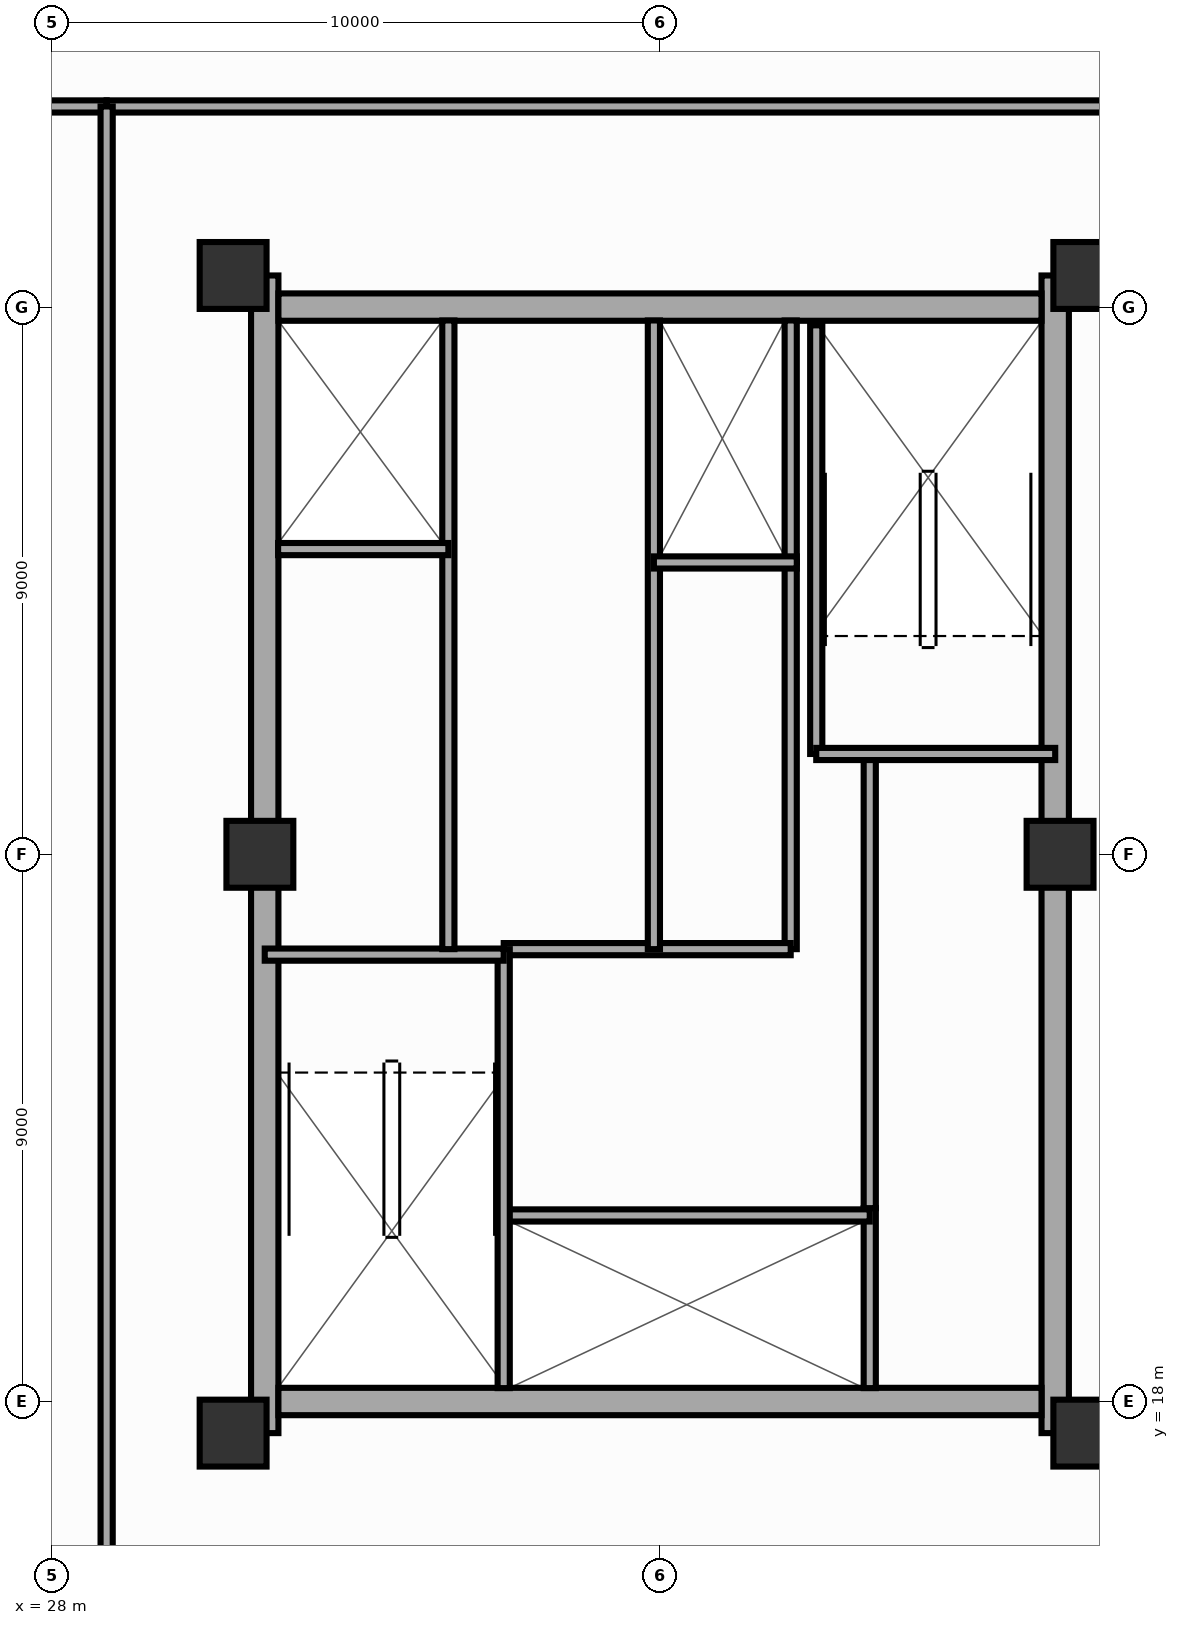
"""IFC4 building model, lengths in metres.
Left out: names, types, materials, properties, quantities, classifications, styles, units other than length and angle.
Written with IfcOpenShell. Run it as: python <this file> out.ifc"""

import sys

from ifc_helpers import new_model, si_unit, direction, frame, frame_2d, origin, origin_2d, place, context, subcontext, project, spatial, rectangle, extrude, source, transform, mapped, element, fill, save


model = new_model("IFC4")
c1 = context("Model", 3, precision=1e-05, world=origin(), true_north=direction((0.0, 1.0)))
c2 = subcontext(c1, "Body", "Model", "MODEL_VIEW")
j1 = project(units=[si_unit("LENGTHUNIT", "METRE"), si_unit("PLANEANGLEUNIT", "RADIAN")], contexts=[c1])
p1 = place(None, origin())
s1 = spatial("IfcSite", under=j1, at=p1, CompositionType="ELEMENT")
p2 = place(p1, origin())
s2 = spatial("IfcBuilding", under=s1, at=p2, CompositionType="ELEMENT")
p3 = place(p2, frame((0.0, 0.0, 206.5)))
s3 = spatial("IfcBuildingStorey", under=s2, at=p3, CompositionType="ELEMENT", Elevation=206.5)
p4 = place(p3, frame((31.5, 17.48, 0.0), z_axis=(0.0, 0.0, 1.0), x_axis=(0.0, 1.0, 0.0)))
e1 = element("IfcWall", 1, at=p4, inside=s3, PredefinedType="SHEAR", context=c2, shape_type="SweptSolid", body=[
    extrude(rectangle(XDim=19.04, YDim=0.45, at=frame_2d((9.52, 0.0))), origin(), (0.0, 0.0, 1.0), 3.8),
])
p5 = place(p4, frame((6.32, 0.0, 0.0)))
e2 = element("IfcOpeningElement", 2, at=p5, cuts=e1, PredefinedType="OPENING", context=c2, shape_type="SweptSolid", body=[
    extrude(rectangle(XDim=1.1, YDim=2.15, at=frame_2d((0.55, 1.075))), frame((0.0, 0.237, 0.0), z_axis=(0.0, -1.0, 0.0), x_axis=(1.0, 0.0, 0.0)), (0.0, 0.0, 1.0), 0.474),
])
p6 = place(p3, frame((44.5, 17.48, 0.0), z_axis=(0.0, 0.0, 1.0), x_axis=(0.0, 1.0, 0.0)))
e3 = element("IfcWall", 3, at=p6, inside=s3, PredefinedType="SHEAR", context=c2, shape_type="SweptSolid", body=[
    extrude(rectangle(XDim=19.04, YDim=0.45, at=frame_2d((9.52, 0.0))), origin(), (0.0, 0.0, 1.0), 3.8),
])
p7 = place(p6, frame((12.67, 0.0, 0.0), z_axis=(0.0, 0.0, 1.0), x_axis=(-1.0, 0.0, 0.0)))
e4 = element("IfcOpeningElement", 4, at=p7, cuts=e3, PredefinedType="OPENING", context=c2, shape_type="SweptSolid", body=[
    extrude(rectangle(XDim=1.1, YDim=2.15, at=frame_2d((0.55, 1.075))), frame((0.0, 0.237, 0.0), z_axis=(0.0, -1.0, 0.0), x_axis=(1.0, 0.0, 0.0)), (0.0, 0.0, 1.0), 0.474),
])
p8 = place(p3, frame((31.725, 18.0, 0.0), z_axis=(0.0, 0.0, 1.0), x_axis=(1.0, 0.0, 0.0)))
e5 = element("IfcWall", 5, at=p8, inside=s3, PredefinedType="SHEAR", context=c2, shape_type="SweptSolid", body=[
    extrude(rectangle(XDim=12.55, YDim=0.45, at=frame_2d((6.275, 0.0))), origin(), (0.0, 0.0, 1.0), 3.8),
])
p9 = place(p3, frame((31.725, 36.0, 0.0), z_axis=(0.0, 0.0, 1.0), x_axis=(1.0, 0.0, 0.0)))
e6 = element("IfcWall", 6, at=p9, inside=s3, PredefinedType="SHEAR", context=c2, shape_type="SweptSolid", body=[
    extrude(rectangle(XDim=12.55, YDim=0.45, at=frame_2d((6.275, 0.0))), origin(), (0.0, 0.0, 1.0), 3.8),
])
p10 = place(p9, frame((5.225, 0.0, 0.0), z_axis=(0.0, 0.0, 1.0), x_axis=(-1.0, 0.0, 0.0)))
e7 = element("IfcOpeningElement", 7, at=p10, cuts=e6, PredefinedType="OPENING", context=c2, shape_type="SweptSolid", body=[
    extrude(rectangle(XDim=1.4, YDim=2.15, at=frame_2d((0.7, 1.075))), frame((0.0, 0.237, 0.0), z_axis=(0.0, -1.0, 0.0), x_axis=(1.0, 0.0, 0.0)), (0.0, 0.0, 1.0), 0.474),
])
m1 = source(origin(), c2, "Body", "SweptSolid", [
    extrude(rectangle(XDim=1.1, YDim=1.1, at=origin_2d()), origin(), (0.0, 0.0, 1.0), 3.8),
])
for number, where, z_axis, x_axis in (
    (8, (30.98, 17.48, 0.0), (0.0, 0.0, 1.0), (1.0, 0.0, 0.0)),
    (9, (45.02, 17.48, 0.0), (0.0, 0.0, 1.0), (1.0, 0.0, 0.0)),
    (10, (30.98, 36.52, 0.0), (0.0, 0.0, 1.0), (1.0, 0.0, 0.0)),
    (11, (45.02, 36.52, 0.0), (0.0, 0.0, 1.0), (1.0, 0.0, 0.0)),
    (12, (31.42, 27.0, 0.0), (0.0, 0.0, 1.0), (1.0, 0.0, 0.0)),
    (13, (44.58, 27.0, 0.0), (0.0, 0.0, 1.0), (1.0, 0.0, 0.0)),
):
    element("IfcColumn", number, at=place(p3, frame(where, z_axis=z_axis, x_axis=x_axis)), inside=s3, PredefinedType="COLUMN", context=c2, shape_type="MappedRepresentation", body=[
        mapped(m1, transform((0.0, 0.0, 0.0), scale=1.0)),
    ])
p11 = place(p3, frame((41.45, 18.22, 0.0), z_axis=(0.0, 0.0, 1.0), x_axis=(0.0, 1.0, 0.0)))
e14 = element("IfcWall", 14, at=p11, inside=s3, PredefinedType="PARTITIONING", context=c2, shape_type="SweptSolid", body=[
    extrude(rectangle(XDim=2.96, YDim=0.2, at=frame_2d((1.48, 0.0))), origin(), (0.0, 0.0, 1.0), 3.59),
])
p12 = place(p3, frame((41.45, 21.18, 0.0), z_axis=(0.0, 0.0, 1.0), x_axis=(0.0, 1.0, 0.0)))
e15 = element("IfcWall", 15, at=p12, inside=s3, PredefinedType="PARTITIONING", context=c2, shape_type="SweptSolid", body=[
    extrude(rectangle(XDim=7.42, YDim=0.2, at=frame_2d((3.71, 0.0))), origin(), (0.0, 0.0, 1.0), 3.59),
])
p13 = place(p12, frame((2.6, 0.0, 0.0)))
e16 = element("IfcOpeningElement", 16, at=p13, cuts=e15, PredefinedType="OPENING", context=c2, shape_type="SweptSolid", body=[
    extrude(rectangle(XDim=0.9, YDim=2.1, at=frame_2d((0.45, 1.05))), frame((0.0, 0.112, 0.0), z_axis=(0.0, -1.0, 0.0), x_axis=(1.0, 0.0, 0.0)), (0.0, 0.0, 1.0), 0.224),
])
p14 = place(p3, frame((40.15, 25.44, 0.0), z_axis=(0.0, 0.0, 1.0), x_axis=(0.0, 1.0, 0.0)))
e17 = element("IfcWall", 17, at=p14, inside=s3, PredefinedType="PARTITIONING", context=c2, shape_type="SweptSolid", body=[
    extrude(rectangle(XDim=6.36, YDim=0.2, at=frame_2d((3.18, 0.0))), origin(), (0.0, 0.0, 1.0), 3.59),
])
p15 = place(p3, frame((40.15, 31.8, 0.0), z_axis=(0.0, 0.0, 1.0), x_axis=(0.0, 1.0, 0.0)))
e18 = element("IfcWall", 18, at=p15, inside=s3, PredefinedType="PARTITIONING", context=c2, shape_type="SweptSolid", body=[
    extrude(rectangle(XDim=3.98, YDim=0.2, at=frame_2d((1.99, 0.0))), origin(), (0.0, 0.0, 1.0), 3.59),
])
p16 = place(p3, frame((35.43, 21.06, 0.0), z_axis=(0.0, 0.0, 1.0), x_axis=(1.0, 0.0, 0.0)))
e19 = element("IfcWall", 19, at=p16, inside=s3, PredefinedType="PARTITIONING", context=c2, shape_type="SweptSolid", body=[
    extrude(rectangle(XDim=6.02, YDim=0.2, at=frame_2d((3.01, 0.0))), origin(), (0.0, 0.0, 1.0), 3.59),
])
p17 = place(p16, frame((1.0, 0.0, 0.0)))
e20 = element("IfcOpeningElement", 20, at=p17, cuts=e19, PredefinedType="OPENING", context=c2, shape_type="SweptSolid", body=[
    extrude(rectangle(XDim=1.1, YDim=2.15, at=frame_2d((0.55, 1.075))), frame((0.0, 0.112, 0.0), z_axis=(0.0, -1.0, 0.0), x_axis=(1.0, 0.0, 0.0)), (0.0, 0.0, 1.0), 0.224),
])
p18 = place(p16, frame((2.95, 0.0, 0.0)))
e21 = element("IfcOpeningElement", 21, at=p18, cuts=e19, PredefinedType="OPENING", context=c2, shape_type="SweptSolid", body=[
    extrude(rectangle(XDim=1.1, YDim=2.15, at=frame_2d((0.55, 1.075))), frame((0.0, 0.112, 0.0), z_axis=(0.0, -1.0, 0.0), x_axis=(1.0, 0.0, 0.0)), (0.0, 0.0, 1.0), 0.224),
])
p19 = place(p16, frame((4.58, 0.0, 0.0)))
e22 = element("IfcOpeningElement", 22, at=p19, cuts=e19, PredefinedType="OPENING", context=c2, shape_type="SweptSolid", body=[
    extrude(rectangle(XDim=1.2, YDim=2.15, at=frame_2d((0.6, 1.075))), frame((0.0, 0.112, 0.0), z_axis=(0.0, -1.0, 0.0), x_axis=(1.0, 0.0, 0.0)), (0.0, 0.0, 1.0), 0.224),
])
p20 = place(p3, frame((35.43, 25.44, 0.0), z_axis=(0.0, 0.0, 1.0), x_axis=(1.0, 0.0, 0.0)))
e23 = element("IfcWall", 23, at=p20, inside=s3, PredefinedType="PARTITIONING", context=c2, shape_type="SweptSolid", body=[
    extrude(rectangle(XDim=4.72, YDim=0.2, at=frame_2d((2.36, 0.0))), origin(), (0.0, 0.0, 1.0), 3.59),
])
p21 = place(p20, frame((1.25, 0.0, 0.0)))
e24 = element("IfcOpeningElement", 24, at=p21, cuts=e23, PredefinedType="OPENING", context=c2, shape_type="SweptSolid", body=[
    extrude(rectangle(XDim=1.1, YDim=2.15, at=frame_2d((0.55, 1.075))), frame((0.0, 0.112, 0.0), z_axis=(0.0, -1.0, 0.0), x_axis=(1.0, 0.0, 0.0)), (0.0, 0.0, 1.0), 0.224),
])
p22 = place(p3, frame((35.43, 18.22, 0.0), z_axis=(0.0, 0.0, 1.0), x_axis=(0.0, 1.0, 0.0)))
e25 = element("IfcWall", 25, at=p22, inside=s3, PredefinedType="SOLIDWALL", context=c2, shape_type="SweptSolid", body=[
    extrude(rectangle(XDim=7.22, YDim=0.2, at=frame_2d((3.61, 0.0))), origin(), (0.0, 0.0, 1.0), 3.59),
])
p23 = place(p22, frame((6.68, 0.0, 0.0), z_axis=(0.0, 0.0, 1.0), x_axis=(-1.0, 0.0, 0.0)))
e26 = element("IfcOpeningElement", 26, at=p23, cuts=e25, PredefinedType="OPENING", context=c2, shape_type="SweptSolid", body=[
    extrude(rectangle(XDim=1.1, YDim=2.15, at=frame_2d((0.55, 1.075))), frame((0.0, 0.112, 0.0), z_axis=(0.0, -1.0, 0.0), x_axis=(1.0, 0.0, 0.0)), (0.0, 0.0, 1.0), 0.224),
])
p24 = place(p3, frame((31.5, 25.35, 0.0), z_axis=(0.0, 0.0, 1.0), x_axis=(1.0, 0.0, 0.0)))
e27 = element("IfcWall", 27, at=p24, inside=s3, PredefinedType="SOLIDWALL", context=c2, shape_type="SweptSolid", body=[
    extrude(rectangle(XDim=3.93, YDim=0.2, at=frame_2d((1.965, 0.0))), origin(), (0.0, 0.0, 1.0), 3.59),
])
p25 = place(p3, frame((40.57, 28.65, 0.0), z_axis=(0.0, 0.0, 1.0), x_axis=(0.0, 1.0, 0.0)))
e28 = element("IfcWall", 28, at=p25, inside=s3, PredefinedType="SOLIDWALL", context=c2, shape_type="SweptSolid", body=[
    extrude(rectangle(XDim=7.05, YDim=0.2, at=frame_2d((3.525, 0.0))), origin(), (0.0, 0.0, 1.0), 3.59),
])
p26 = place(p3, frame((40.57, 28.65, 0.0), z_axis=(0.0, 0.0, 1.0), x_axis=(1.0, 0.0, 0.0)))
e29 = element("IfcWall", 29, at=p26, inside=s3, PredefinedType="SOLIDWALL", context=c2, shape_type="SweptSolid", body=[
    extrude(rectangle(XDim=3.93, YDim=0.2, at=frame_2d((1.965, 0.0))), origin(), (0.0, 0.0, 1.0), 3.59),
])
p27 = place(p3, frame((34.52, 25.44, 0.0), z_axis=(0.0, 0.0, 1.0), x_axis=(0.0, 1.0, 0.0)))
e30 = element("IfcWall", 30, at=p27, inside=s3, PredefinedType="PARTITIONING", context=c2, shape_type="SweptSolid", body=[
    extrude(rectangle(XDim=10.34, YDim=0.2, at=frame_2d((5.17, 0.0))), origin(), (0.0, 0.0, 1.0), 3.59),
])
p28 = place(p27, frame((2.6, 0.0, 0.0)))
e31 = element("IfcOpeningElement", 31, at=p28, cuts=e30, PredefinedType="OPENING", context=c2, shape_type="SweptSolid", body=[
    extrude(rectangle(XDim=0.9, YDim=2.1, at=frame_2d((0.45, 1.05))), frame((0.0, 0.112, 0.0), z_axis=(0.0, -1.0, 0.0), x_axis=(1.0, 0.0, 0.0)), (0.0, 0.0, 1.0), 0.224),
])
p29 = place(p27, frame((7.01, 0.0, 0.0)))
e32 = element("IfcOpeningElement", 32, at=p29, cuts=e30, PredefinedType="OPENING", context=c2, shape_type="SweptSolid", body=[
    extrude(rectangle(XDim=1.0, YDim=2.15, at=frame_2d((0.5, 1.075))), frame((0.0, 0.112, 0.0), z_axis=(0.0, -1.0, 0.0), x_axis=(1.0, 0.0, 0.0)), (0.0, 0.0, 1.0), 0.224),
])
p30 = place(p27, frame((8.76, 0.0, 0.0)))
e33 = element("IfcOpeningElement", 33, at=p30, cuts=e30, PredefinedType="OPENING", context=c2, shape_type="SweptSolid", body=[
    extrude(rectangle(XDim=1.0, YDim=2.15, at=frame_2d((0.5, 1.075))), frame((0.0, 0.112, 0.0), z_axis=(0.0, -1.0, 0.0), x_axis=(1.0, 0.0, 0.0)), (0.0, 0.0, 1.0), 0.224),
])
p31 = place(p3, frame((31.72, 32.02, 0.0), z_axis=(0.0, 0.0, 1.0), x_axis=(1.0, 0.0, 0.0)))
e34 = element("IfcWall", 34, at=p31, inside=s3, PredefinedType="PARTITIONING", context=c2, shape_type="SweptSolid", body=[
    extrude(rectangle(XDim=2.8, YDim=0.2, at=frame_2d((1.4, 0.0))), origin(), (0.0, 0.0, 1.0), 3.59),
])
p32 = place(p3, frame((37.9, 25.44, 0.0), z_axis=(0.0, 0.0, 1.0), x_axis=(0.0, 1.0, 0.0)))
e35 = element("IfcWall", 35, at=p32, inside=s3, PredefinedType="PARTITIONING", context=c2, shape_type="SweptSolid", body=[
    extrude(rectangle(XDim=10.34, YDim=0.2, at=frame_2d((5.17, 0.0))), origin(), (0.0, 0.0, 1.0), 3.59),
])
p33 = place(p32, frame((2.6, 0.0, 0.0)))
e36 = element("IfcOpeningElement", 36, at=p33, cuts=e35, PredefinedType="OPENING", context=c2, shape_type="SweptSolid", body=[
    extrude(rectangle(XDim=0.9, YDim=2.1, at=frame_2d((0.45, 1.05))), frame((0.0, 0.112, 0.0), z_axis=(0.0, -1.0, 0.0), x_axis=(1.0, 0.0, 0.0)), (0.0, 0.0, 1.0), 0.224),
])
p34 = place(p32, frame((6.86, 0.0, 0.0)))
e37 = element("IfcOpeningElement", 37, at=p34, cuts=e35, PredefinedType="OPENING", context=c2, shape_type="SweptSolid", body=[
    extrude(rectangle(XDim=1.0, YDim=2.15, at=frame_2d((0.5, 1.075))), frame((0.0, 0.112, 0.0), z_axis=(0.0, -1.0, 0.0), x_axis=(1.0, 0.0, 0.0)), (0.0, 0.0, 1.0), 0.224),
])
p35 = place(p32, frame((8.71, 0.0, 0.0)))
e38 = element("IfcOpeningElement", 38, at=p35, cuts=e35, PredefinedType="OPENING", context=c2, shape_type="SweptSolid", body=[
    extrude(rectangle(XDim=1.0, YDim=2.15, at=frame_2d((0.5, 1.075))), frame((0.0, 0.112, 0.0), z_axis=(0.0, -1.0, 0.0), x_axis=(1.0, 0.0, 0.0)), (0.0, 0.0, 1.0), 0.224),
])
p36 = place(p3, frame((37.9, 31.8, 0.0), z_axis=(0.0, 0.0, 1.0), x_axis=(1.0, 0.0, 0.0)))
e39 = element("IfcWall", 39, at=p36, inside=s3, PredefinedType="PARTITIONING", context=c2, shape_type="SweptSolid", body=[
    extrude(rectangle(XDim=2.35, YDim=0.2, at=frame_2d((1.175, 0.0))), origin(), (0.0, 0.0, 1.0), 3.59),
])
p37 = place(p3, frame((25.0, 39.3, 0.0), z_axis=(0.0, 0.0, 1.0), x_axis=(1.0, 0.0, 0.0)))
e40 = element("IfcWall", 40, at=p37, inside=s3, PredefinedType="PARTITIONING", context=c2, shape_type="SweptSolid", body=[
    extrude(rectangle(XDim=3.9, YDim=0.2, at=frame_2d((1.95, 0.0))), origin(), (0.0, 0.0, 1.0), 3.59),
])
p38 = place(p3, frame((28.9, 39.3, 0.0), z_axis=(0.0, 0.0, 1.0), x_axis=(1.0, 0.0, 0.0)))
e41 = element("IfcWall", 41, at=p38, inside=s3, PredefinedType="PARTITIONING", context=c2, shape_type="SweptSolid", body=[
    extrude(rectangle(XDim=18.2, YDim=0.2, at=frame_2d((9.1, 0.0))), origin(), (0.0, 0.0, 1.0), 3.59),
])
p39 = place(p38, frame((8.55, 0.0, 0.0)))
e42 = element("IfcOpeningElement", 42, at=p39, cuts=e41, PredefinedType="OPENING", context=c2, shape_type="SweptSolid", body=[
    extrude(rectangle(XDim=1.1, YDim=2.15, at=frame_2d((0.55, 1.075))), frame((0.0, 0.112, 0.0), z_axis=(0.0, -1.0, 0.0), x_axis=(1.0, 0.0, 0.0)), (0.0, 0.0, 1.0), 0.224),
])
p40 = place(p3, frame((28.9, 14.5, 0.0), z_axis=(0.0, 0.0, 1.0), x_axis=(0.0, 1.0, 0.0)))
e43 = element("IfcWall", 43, at=p40, inside=s3, PredefinedType="PARTITIONING", context=c2, shape_type="SweptSolid", body=[
    extrude(rectangle(XDim=24.8, YDim=0.2, at=frame_2d((12.4, 0.0))), origin(), (0.0, 0.0, 1.0), 3.59),
])
p41 = place(p40, frame((11.85, 0.0, 0.0)))
e44 = element("IfcOpeningElement", 44, at=p41, cuts=e43, PredefinedType="OPENING", context=c2, shape_type="SweptSolid", body=[
    extrude(rectangle(XDim=1.1, YDim=2.15, at=frame_2d((0.55, 1.075))), frame((0.0, 0.112, 0.0), z_axis=(0.0, -1.0, 0.0), x_axis=(1.0, 0.0, 0.0)), (0.0, 0.0, 1.0), 0.224),
])
m2 = source(origin(), c2, "Body", "SweptSolid", [
    extrude(rectangle(XDim=1.1, YDim=2.15, at=frame_2d((0.55, 1.075))), frame((0.0, 0.025, 0.0), z_axis=(0.0, -1.0, 0.0), x_axis=(1.0, 0.0, 0.0)), (0.0, 0.0, 1.0), 0.05),
])
p42 = place(p5, origin())
e45 = element("IfcDoor", 45, at=p42, inside=s3, OperationType="SINGLE_SWING_LEFT", PredefinedType="DOOR", context=c2, shape_type="MappedRepresentation", body=[
    mapped(m2, transform((0.0, 0.0, 0.0), scale=1.0)),
])
fill(e2, e45)
p43 = place(p7, origin())
e46 = element("IfcDoor", 46, at=p43, inside=s3, OperationType="SINGLE_SWING_RIGHT", PredefinedType="DOOR", context=c2, shape_type="MappedRepresentation", body=[
    mapped(m2, transform((0.0, 0.0, 0.0), scale=1.0)),
])
fill(e4, e46)
m3 = source(origin(), c2, "Body", "SweptSolid", [
    extrude(rectangle(XDim=1.4, YDim=2.15, at=frame_2d((0.7, 1.075))), frame((0.0, 0.025, 0.0), z_axis=(0.0, -1.0, 0.0), x_axis=(1.0, 0.0, 0.0)), (0.0, 0.0, 1.0), 0.05),
])
p44 = place(p10, origin())
e47 = element("IfcDoor", 47, at=p44, inside=s3, OperationType="SINGLE_SWING_RIGHT", PredefinedType="DOOR", context=c2, shape_type="MappedRepresentation", body=[
    mapped(m3, transform((0.0, 0.0, 0.0), scale=1.0)),
])
fill(e7, e47)
m4 = source(origin(), c2, "Body", "SweptSolid", [
    extrude(rectangle(XDim=0.9, YDim=2.1, at=frame_2d((0.45, 1.05))), frame((0.0, 0.025, 0.0), z_axis=(0.0, -1.0, 0.0), x_axis=(1.0, 0.0, 0.0)), (0.0, 0.0, 1.0), 0.05),
])
p45 = place(p13, origin())
e48 = element("IfcDoor", 48, at=p45, inside=s3, OperationType="SINGLE_SWING_RIGHT", PredefinedType="DOOR", context=c2, shape_type="MappedRepresentation", body=[
    mapped(m4, transform((0.0, 0.0, 0.0), scale=1.0)),
])
fill(e16, e48)
p46 = place(p17, origin())
e49 = element("IfcDoor", 49, at=p46, inside=s3, OperationType="DOUBLE_DOOR_SLIDING", PredefinedType="DOOR", context=c2, shape_type="MappedRepresentation", body=[
    mapped(m2, transform((0.0, 0.0, 0.0), scale=1.0)),
])
fill(e20, e49)
p47 = place(p18, origin())
e50 = element("IfcDoor", 50, at=p47, inside=s3, OperationType="DOUBLE_DOOR_SLIDING", PredefinedType="DOOR", context=c2, shape_type="MappedRepresentation", body=[
    mapped(m2, transform((0.0, 0.0, 0.0), scale=1.0)),
])
fill(e21, e50)
m5 = source(origin(), c2, "Body", "SweptSolid", [
    extrude(rectangle(XDim=1.2, YDim=2.15, at=frame_2d((0.6, 1.075))), frame((0.0, 0.025, 0.0), z_axis=(0.0, -1.0, 0.0), x_axis=(1.0, 0.0, 0.0)), (0.0, 0.0, 1.0), 0.05),
])
p48 = place(p19, origin())
e51 = element("IfcDoor", 51, at=p48, inside=s3, OperationType="DOUBLE_DOOR_SLIDING", PredefinedType="DOOR", context=c2, shape_type="MappedRepresentation", body=[
    mapped(m5, transform((0.0, 0.0, 0.0), scale=1.0)),
])
fill(e22, e51)
p49 = place(p21, origin())
e52 = element("IfcDoor", 52, at=p49, inside=s3, OperationType="SINGLE_SWING_LEFT", PredefinedType="DOOR", context=c2, shape_type="MappedRepresentation", body=[
    mapped(m2, transform((0.0, 0.0, 0.0), scale=1.0)),
])
fill(e24, e52)
p50 = place(p23, origin())
e53 = element("IfcDoor", 53, at=p50, inside=s3, OperationType="SINGLE_SWING_RIGHT", PredefinedType="DOOR", context=c2, shape_type="MappedRepresentation", body=[
    mapped(m2, transform((0.0, 0.0, 0.0), scale=1.0)),
])
fill(e26, e53)
p51 = place(p28, origin())
e54 = element("IfcDoor", 54, at=p51, inside=s3, OperationType="SINGLE_SWING_LEFT", PredefinedType="DOOR", context=c2, shape_type="MappedRepresentation", body=[
    mapped(m4, transform((0.0, 0.0, 0.0), scale=1.0)),
])
fill(e31, e54)
m6 = source(origin(), c2, "Body", "SweptSolid", [
    extrude(rectangle(XDim=1.0, YDim=2.15, at=frame_2d((0.5, 1.075))), frame((0.0, 0.025, 0.0), z_axis=(0.0, -1.0, 0.0), x_axis=(1.0, 0.0, 0.0)), (0.0, 0.0, 1.0), 0.05),
])
p52 = place(p29, origin())
e55 = element("IfcDoor", 55, at=p52, inside=s3, OperationType="DOUBLE_DOOR_SLIDING", PredefinedType="DOOR", context=c2, shape_type="MappedRepresentation", body=[
    mapped(m6, transform((0.0, 0.0, 0.0), scale=1.0)),
])
fill(e32, e55)
p53 = place(p30, origin())
e56 = element("IfcDoor", 56, at=p53, inside=s3, OperationType="DOUBLE_DOOR_SLIDING", PredefinedType="DOOR", context=c2, shape_type="MappedRepresentation", body=[
    mapped(m6, transform((0.0, 0.0, 0.0), scale=1.0)),
])
fill(e33, e56)
p54 = place(p33, origin())
e57 = element("IfcDoor", 57, at=p54, inside=s3, OperationType="SINGLE_SWING_RIGHT", PredefinedType="DOOR", context=c2, shape_type="MappedRepresentation", body=[
    mapped(m4, transform((0.0, 0.0, 0.0), scale=1.0)),
])
fill(e36, e57)
p55 = place(p34, origin())
e58 = element("IfcDoor", 58, at=p55, inside=s3, OperationType="DOUBLE_DOOR_SLIDING", PredefinedType="DOOR", context=c2, shape_type="MappedRepresentation", body=[
    mapped(m6, transform((0.0, 0.0, 0.0), scale=1.0)),
])
fill(e37, e58)
p56 = place(p35, origin())
e59 = element("IfcDoor", 59, at=p56, inside=s3, OperationType="DOUBLE_DOOR_SLIDING", PredefinedType="DOOR", context=c2, shape_type="MappedRepresentation", body=[
    mapped(m6, transform((0.0, 0.0, 0.0), scale=1.0)),
])
fill(e38, e59)
p57 = place(p39, origin())
e60 = element("IfcDoor", 60, at=p57, inside=s3, OperationType="SINGLE_SWING_LEFT", PredefinedType="DOOR", context=c2, shape_type="MappedRepresentation", body=[
    mapped(m2, transform((0.0, 0.0, 0.0), scale=1.0)),
])
fill(e42, e60)
p58 = place(p41, origin())
e61 = element("IfcDoor", 61, at=p58, inside=s3, OperationType="SINGLE_SWING_RIGHT", PredefinedType="DOOR", context=c2, shape_type="MappedRepresentation", body=[
    mapped(m2, transform((0.0, 0.0, 0.0), scale=1.0)),
])
fill(e44, e61)
save(model, sys.argv[1])
